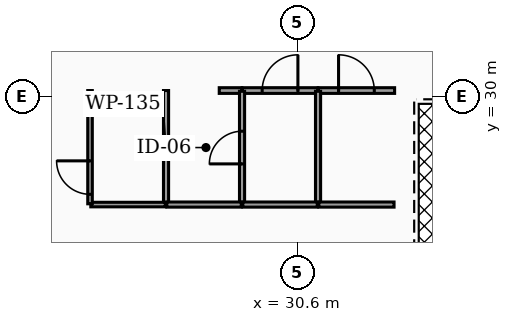
"""IFC4 building model, lengths in metres.
Left out: names, types, materials, properties, quantities, classifications, styles, units other than length and angle.
Written with IfcOpenShell. Run it as: python <this file> out.ifc"""

import sys

from ifc_helpers import new_model, si_unit, direction, frame, frame_2d, origin, place, context, subcontext, project, spatial, rectangle, extrude, element, fill, save


model = new_model("IFC4")
c1 = context("Model", 3, precision=1e-05, world=origin(), true_north=direction((0.0, 1.0)))
c2 = subcontext(c1, "Body", "Model", "MODEL_VIEW")
j1 = project(units=[si_unit("LENGTHUNIT", "METRE"), si_unit("PLANEANGLEUNIT", "RADIAN")], contexts=[c1])
p1 = place(None, origin())
s1 = spatial("IfcSite", under=j1, at=p1, CompositionType="ELEMENT")
p2 = place(p1, origin())
s2 = spatial("IfcBuilding", under=s1, at=p2, CompositionType="ELEMENT")
p3 = place(p2, frame((0.0, 0.0, 138.38)))
s3 = spatial("IfcBuildingStorey", under=s2, at=p3, CompositionType="ELEMENT", Elevation=138.38)
p4 = place(p3, frame((28.55, 30.15, 0.0), z_axis=(0.0, 0.0, 1.0), x_axis=(1.0, 0.0, 0.0)))
e1 = element("IfcWall", 1, at=p4, inside=s3, PredefinedType="PARTITIONING", context=c2, shape_type="SweptSolid", body=[
    extrude(rectangle(XDim=0.595, YDim=0.15, at=frame_2d((0.297, 0.0))), origin(), (0.0, 0.0, 1.0), 2.457),
])
p5 = place(p3, frame((29.155, 30.15, 0.0), z_axis=(0.0, 0.0, 1.0), x_axis=(1.0, 0.0, 0.0)))
e2 = element("IfcWall", 2, at=p5, inside=s3, PredefinedType="PARTITIONING", context=c2, shape_type="SweptSolid", body=[
    extrude(rectangle(XDim=1.99, YDim=0.15, at=frame_2d((0.995, 0.0))), origin(), (0.0, 0.0, 1.0), 2.457),
])
p6 = place(p5, frame((0.525, 0.0, 0.0)))
e3 = element("IfcOpeningElement", 3, at=p6, cuts=e2, PredefinedType="OPENING", context=c2, shape_type="SweptSolid", body=[
    extrude(rectangle(XDim=0.94, YDim=2.05, at=frame_2d((0.47, 1.025))), frame((0.0, 0.085, 0.0), z_axis=(0.0, -1.0, 0.0), x_axis=(1.0, 0.0, 0.0)), (0.0, 0.0, 1.0), 0.17),
])
p7 = place(p3, frame((31.155, 30.15, 0.0), z_axis=(0.0, 0.0, 1.0), x_axis=(1.0, 0.0, 0.0)))
e4 = element("IfcWall", 4, at=p7, inside=s3, PredefinedType="PARTITIONING", context=c2, shape_type="SweptSolid", body=[
    extrude(rectangle(XDim=2.01, YDim=0.15, at=frame_2d((1.005, 0.0))), origin(), (0.0, 0.0, 1.0), 2.457),
])
p8 = place(p7, frame((0.535, 0.0, 0.0)))
e5 = element("IfcOpeningElement", 5, at=p8, cuts=e4, PredefinedType="OPENING", context=c2, shape_type="SweptSolid", body=[
    extrude(rectangle(XDim=0.94, YDim=2.05, at=frame_2d((0.47, 1.025))), frame((0.0, 0.085, 0.0), z_axis=(0.0, -1.0, 0.0), x_axis=(1.0, 0.0, 0.0)), (0.0, 0.0, 1.0), 0.17),
])
p9 = place(p3, frame((27.15, 27.17, 0.0), z_axis=(0.0, 0.0, 1.0), x_axis=(0.0, 1.0, 0.0)))
e6 = element("IfcWall", 6, at=p9, inside=s3, PredefinedType="PARTITIONING", context=c2, shape_type="SweptSolid", body=[
    extrude(rectangle(XDim=2.98, YDim=0.135, at=frame_2d((1.49, 0.0))), origin(), (0.0, 0.0, 1.0), 2.457),
])
p10 = place(p3, frame((25.17, 27.15, 0.0), z_axis=(0.0, 0.0, 1.0), x_axis=(1.0, 0.0, 0.0)))
e7 = element("IfcWall", 7, at=p10, inside=s3, PredefinedType="PARTITIONING", context=c2, shape_type="SweptSolid", body=[
    extrude(rectangle(XDim=1.96, YDim=0.12, at=frame_2d((0.98, 0.0))), origin(), (0.0, 0.0, 1.0), 2.457),
])
p11 = place(p3, frame((25.15, 27.17, 0.0), z_axis=(0.0, 0.0, 1.0), x_axis=(0.0, 1.0, 0.0)))
e8 = element("IfcWall", 8, at=p11, inside=s3, PredefinedType="PARTITIONING", context=c2, shape_type="SweptSolid", body=[
    extrude(rectangle(XDim=2.98, YDim=0.12, at=frame_2d((1.49, 0.0))), origin(), (0.0, 0.0, 1.0), 2.457),
])
p12 = place(p11, frame((0.25, 0.0, 0.0)))
e9 = element("IfcOpeningElement", 9, at=p12, cuts=e8, PredefinedType="OPENING", context=c2, shape_type="SweptSolid", body=[
    extrude(rectangle(XDim=0.88, YDim=2.05, at=frame_2d((0.44, 1.025))), frame((0.0, 0.07, 0.0), z_axis=(0.0, -1.0, 0.0), x_axis=(1.0, 0.0, 0.0)), (0.0, 0.0, 1.0), 0.14),
])
p13 = place(p3, frame((29.15, 27.17, 0.0), z_axis=(0.0, 0.0, 1.0), x_axis=(0.0, 1.0, 0.0)))
e10 = element("IfcWall", 10, at=p13, inside=s3, PredefinedType="PARTITIONING", context=c2, shape_type="SweptSolid", body=[
    extrude(rectangle(XDim=2.96, YDim=0.135, at=frame_2d((1.48, 0.0))), origin(), (0.0, 0.0, 1.0), 2.457),
])
p14 = place(p13, frame((1.05, 0.0, 0.0)))
e11 = element("IfcOpeningElement", 11, at=p14, cuts=e10, PredefinedType="OPENING", context=c2, shape_type="SweptSolid", body=[
    extrude(rectangle(XDim=0.86, YDim=2.05, at=frame_2d((0.43, 1.025))), frame((0.0, 0.077, 0.0), z_axis=(0.0, -1.0, 0.0), x_axis=(1.0, 0.0, 0.0)), (0.0, 0.0, 1.0), 0.155),
])
p15 = place(p3, frame((27.17, 27.15, 0.0), z_axis=(0.0, 0.0, 1.0), x_axis=(1.0, 0.0, 0.0)))
e12 = element("IfcWall", 12, at=p15, inside=s3, PredefinedType="PARTITIONING", context=c2, shape_type="SweptSolid", body=[
    extrude(rectangle(XDim=1.96, YDim=0.135, at=frame_2d((0.98, 0.0))), origin(), (0.0, 0.0, 1.0), 2.457),
])
p16 = place(p3, frame((31.15, 27.17, 0.0), z_axis=(0.0, 0.0, 1.0), x_axis=(0.0, 1.0, 0.0)))
e13 = element("IfcWall", 13, at=p16, inside=s3, PredefinedType="PARTITIONING", context=c2, shape_type="SweptSolid", body=[
    extrude(rectangle(XDim=2.96, YDim=0.135, at=frame_2d((1.48, 0.0))), origin(), (0.0, 0.0, 1.0), 2.457),
])
p17 = place(p3, frame((29.17, 27.15, 0.0), z_axis=(0.0, 0.0, 1.0), x_axis=(1.0, 0.0, 0.0)))
e14 = element("IfcWall", 14, at=p17, inside=s3, PredefinedType="PARTITIONING", context=c2, shape_type="SweptSolid", body=[
    extrude(rectangle(XDim=1.96, YDim=0.135, at=frame_2d((0.98, 0.0))), origin(), (0.0, 0.0, 1.0), 2.457),
])
p18 = place(p3, frame((31.17, 27.15, 0.0), z_axis=(0.0, 0.0, 1.0), x_axis=(1.0, 0.0, 0.0)))
e15 = element("IfcWall", 15, at=p18, inside=s3, PredefinedType="PARTITIONING", context=c2, shape_type="SweptSolid", body=[
    extrude(rectangle(XDim=1.98, YDim=0.135, at=frame_2d((0.99, 0.0))), origin(), (0.0, 0.0, 1.0), 2.457),
])
p19 = place(p6, origin())
e16 = element("IfcDoor", 16, at=p19, inside=s3, OperationType="SINGLE_SWING_RIGHT", PredefinedType="DOOR", context=c2, shape_type="SweptSolid", body=[
    extrude(rectangle(XDim=0.94, YDim=2.05, at=frame_2d((0.47, 1.025))), frame((0.0, 0.025, 0.0), z_axis=(0.0, -1.0, 0.0), x_axis=(1.0, 0.0, 0.0)), (0.0, 0.0, 1.0), 0.05),
])
fill(e3, e16)
p20 = place(p8, origin())
e17 = element("IfcDoor", 17, at=p20, inside=s3, OperationType="SINGLE_SWING_LEFT", PredefinedType="DOOR", context=c2, shape_type="SweptSolid", body=[
    extrude(rectangle(XDim=0.94, YDim=2.05, at=frame_2d((0.47, 1.025))), frame((0.0, 0.025, 0.0), z_axis=(0.0, -1.0, 0.0), x_axis=(1.0, 0.0, 0.0)), (0.0, 0.0, 1.0), 0.05),
])
fill(e5, e17)
p21 = place(p12, origin())
e18 = element("IfcDoor", 18, at=p21, inside=s3, OperationType="SINGLE_SWING_RIGHT", PredefinedType="DOOR", context=c2, shape_type="SweptSolid", body=[
    extrude(rectangle(XDim=0.88, YDim=2.05, at=frame_2d((0.44, 1.025))), frame((0.0, 0.025, 0.0), z_axis=(0.0, -1.0, 0.0), x_axis=(1.0, 0.0, 0.0)), (0.0, 0.0, 1.0), 0.05),
])
fill(e9, e18)
p22 = place(p14, origin())
e19 = element("IfcDoor", 19, at=p22, inside=s3, OperationType="SINGLE_SWING_LEFT", PredefinedType="DOOR", context=c2, shape_type="SweptSolid", body=[
    extrude(rectangle(XDim=0.86, YDim=2.05, at=frame_2d((0.43, 1.025))), frame((0.0, 0.025, 0.0), z_axis=(0.0, -1.0, 0.0), x_axis=(1.0, 0.0, 0.0)), (0.0, 0.0, 1.0), 0.05),
])
fill(e11, e19)
save(model, sys.argv[1])
